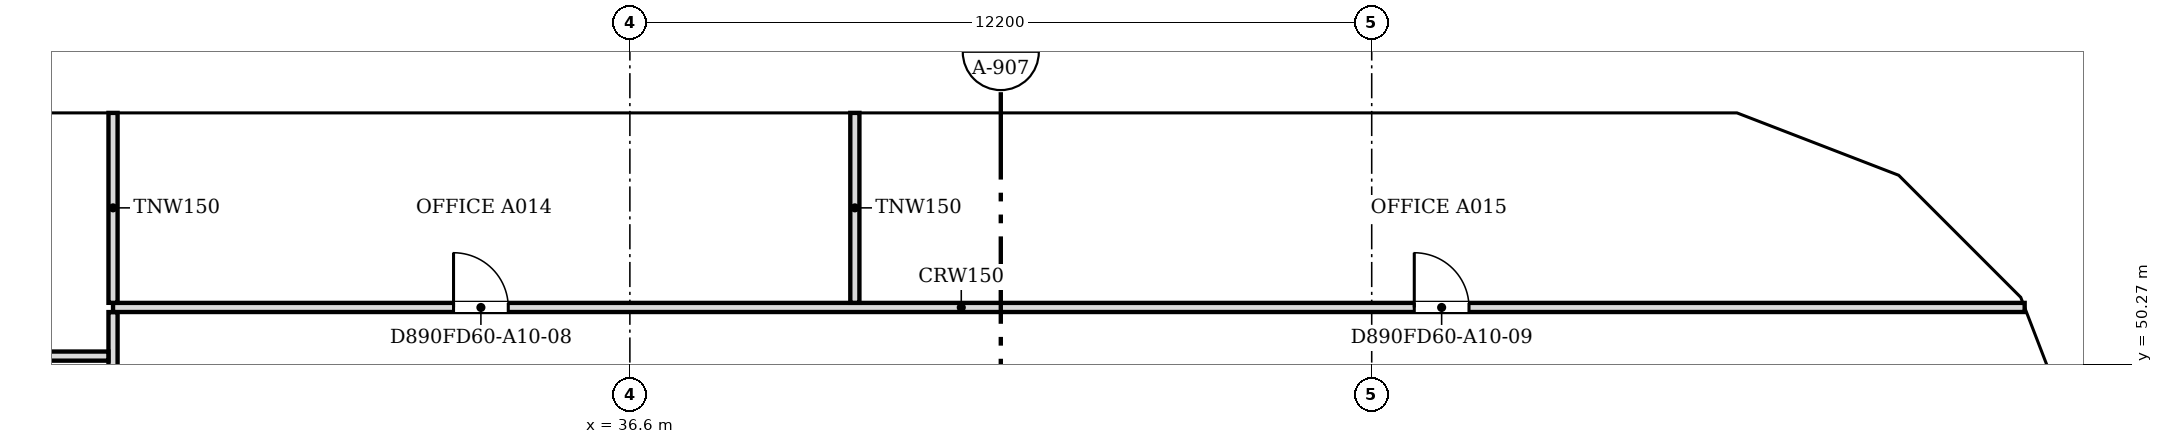
"""IFC4 building model, lengths in metres.
Left out: names, types, materials, properties, quantities, classifications, styles, units other than length and angle.
Written with IfcOpenShell. Run it as: python <this file> out.ifc"""

import sys

from ifc_helpers import new_model, si_unit, direction, frame, frame_2d, origin, place, context, subcontext, project, spatial, polyline, rectangle, outline, extrude, faceted_brep, source, transform, mapped, element, fill, save


model = new_model("IFC4")
c1 = context("Model", 3, precision=1e-05, world=origin(), true_north=direction((0.0, 1.0)))
c2 = subcontext(c1, "Body", "Model", "MODEL_VIEW")
j1 = project(units=[si_unit("LENGTHUNIT", "METRE"), si_unit("PLANEANGLEUNIT", "RADIAN")], contexts=[c1])
p1 = place(None, origin())
s1 = spatial("IfcSite", under=j1, at=p1, CompositionType="ELEMENT")
p2 = place(p1, origin())
s2 = spatial("IfcBuilding", under=s1, at=p2, CompositionType="ELEMENT")
p3 = place(p2, frame((0.0, 0.0, 116.4)))
s3 = spatial("IfcBuildingStorey", under=s2, at=p3, CompositionType="ELEMENT", Elevation=116.4)
m1 = source(origin(), c2, "Body", "Brep", [
    faceted_brep([(0.047, -0.25, 0.0), (2.997, -0.25, 3.8), (0.047, -0.25, 7.6), (0.0, -0.25, 7.541), (0.0, -0.25, 0.059), (0.093, 0.25, 7.54), (2.944, 0.25, 3.868), (2.944, 0.25, 3.732), (0.093, 0.25, 0.06), (2.997, 0.0, 3.8), (0.047, 0.0, 0.0), (0.047, 0.0, 7.6)], [[[0, 1, 2, 3, 4]], [[5, 6, 7, 8]], [[8, 7, 9, 1, 0, 10]], [[6, 5, 11, 2, 1, 9]], [[3, 2, 11]], [[10, 0, 4]], [[8, 10, 4, 3, 11, 5]], [[9, 7, 6]]]),
])
p4 = place(p3, frame((60.767, 48.71, -3.8), z_axis=(0.0, 0.0, 1.0), x_axis=(-0.359901446078, 0.932990326376, 0.0)))
e1 = element("IfcWall", 1, at=p4, inside=s3, PredefinedType="SOLIDWALL", context=c2, shape_type="MappedRepresentation", body=[
    mapped(m1, transform((0.0, 0.0, 0.0), scale=1.0)),
])
m2 = source(origin(), c2, "Body", "SweptSolid", [
    extrude(outline(polyline([(0.247, 0.665), (2.681, 3.8), (0.247, 6.935), (0.247, 0.665)])), frame((0.0, 0.26, 0.0), z_axis=(0.0, -1.0, 0.0), x_axis=(1.0, 0.0, 0.0)), (0.0, 0.0, 1.0), 0.52),
])
p5 = place(p4, origin())
e2 = element("IfcOpeningElement", 2, at=p5, cuts=e1, PredefinedType="OPENING", context=c2, shape_type="MappedRepresentation", body=[
    mapped(m2, transform((0.0, 0.0, 0.0), scale=1.0)),
])
m3 = source(origin(), c2, "Body", "Brep", [
    faceted_brep([(2.944, -0.25, 0.0), (2.997, -0.25, 0.068), (2.997, -0.25, 7.532), (2.944, -0.25, 7.6), (0.0, -0.25, 3.8), (0.053, 0.25, 3.868), (2.891, 0.25, 7.532), (2.891, 0.25, 0.068), (0.053, 0.25, 3.731), (2.944, 0.0, 0.0), (2.944, 0.0, 7.6), (0.0, 0.0, 3.8)], [[[0, 1, 2, 3, 4]], [[5, 6, 7, 8]], [[1, 0, 9]], [[10, 3, 2]], [[6, 5, 11, 4, 3, 10]], [[8, 7, 9, 0, 4, 11]], [[8, 11, 5]], [[1, 9, 7, 6, 10, 2]]]),
])
p6 = place(p3, frame((59.688, 51.506, -3.8), z_axis=(0.0, 0.0, 1.0), x_axis=(-0.707106781187, 0.707106781187, 0.0)))
e3 = element("IfcWall", 3, at=p6, inside=s3, PredefinedType="SOLIDWALL", context=c2, shape_type="MappedRepresentation", body=[
    mapped(m3, transform((0.0, 0.0, 0.0), scale=1.0)),
])
m4 = source(origin(), c2, "Body", "SweptSolid", [
    extrude(outline(polyline([(2.744, 6.934), (0.316, 3.8), (2.744, 0.666), (2.744, 6.934)])), frame((0.0, 0.26, 0.0), z_axis=(0.0, -1.0, 0.0), x_axis=(1.0, 0.0, 0.0)), (0.0, 0.0, 1.0), 0.52),
])
p7 = place(p6, origin())
e4 = element("IfcOpeningElement", 4, at=p7, cuts=e3, PredefinedType="OPENING", context=c2, shape_type="MappedRepresentation", body=[
    mapped(m4, transform((0.0, 0.0, 0.0), scale=1.0)),
])
m5 = source(origin(), c2, "Body", "Brep", [
    faceted_brep([(0.053, -0.25, 0.0), (3.003, -0.25, 3.8), (0.053, -0.25, 7.6), (0.0, -0.25, 7.531), (0.0, -0.25, 0.068), (0.106, 0.25, 7.532), (2.957, 0.25, 3.86), (2.957, 0.25, 3.74), (0.106, 0.25, 0.068), (3.003, 0.0, 3.8), (0.053, 0.0, 0.0), (0.053, 0.0, 7.6)], [[[0, 1, 2, 3, 4]], [[5, 6, 7, 8]], [[8, 7, 9, 1, 0, 10]], [[6, 5, 11, 2, 1, 9]], [[3, 2, 11]], [[10, 0, 4]], [[8, 10, 4, 3, 11, 5]], [[9, 7, 6]]]),
])
p8 = place(p3, frame((57.656, 53.569, -3.8), z_axis=(0.0, 0.0, 1.0), x_axis=(-0.933007896601, 0.359855894603, 0.0)))
e5 = element("IfcWall", 5, at=p8, inside=s3, PredefinedType="SOLIDWALL", context=c2, shape_type="MappedRepresentation", body=[
    mapped(m5, transform((0.0, 0.0, 0.0), scale=1.0)),
])
m6 = source(origin(), c2, "Body", "SweptSolid", [
    extrude(outline(polyline([(0.253, 0.665), (2.687, 3.8), (0.253, 6.935), (0.253, 0.665)])), frame((0.0, 0.26, 0.0), z_axis=(0.0, -1.0, 0.0), x_axis=(1.0, 0.0, 0.0)), (0.0, 0.0, 1.0), 0.52),
])
p9 = place(p8, origin())
e6 = element("IfcOpeningElement", 6, at=p9, cuts=e5, PredefinedType="OPENING", context=c2, shape_type="MappedRepresentation", body=[
    mapped(m6, transform((0.0, 0.0, 0.0), scale=1.0)),
])
m7 = source(origin(), c2, "Body", "Brep", [
    faceted_brep([(3.003, -0.25, 0.0), (6.053, -0.25, 3.8), (3.003, -0.25, 7.6), (0.0, -0.25, 3.8), (0.047, 0.25, 3.859), (3.003, 0.25, 7.6), (6.053, 0.25, 3.8), (3.003, 0.25, 0.0), (0.047, 0.25, 3.741), (0.0, 0.0, 3.8)], [[[0, 1, 2, 3]], [[4, 5, 6, 7, 8]], [[7, 6, 1, 0]], [[6, 5, 2, 1]], [[5, 4, 9, 3, 2]], [[8, 7, 0, 3, 9]], [[8, 9, 4]]]),
])
p10 = place(p3, frame((54.854, 54.65, -3.8), z_axis=(0.0, 0.0, 1.0), x_axis=(-1.0, 0.0, 0.0)))
e7 = element("IfcWall", 7, at=p10, inside=s3, PredefinedType="SOLIDWALL", context=c2, shape_type="MappedRepresentation", body=[
    mapped(m7, transform((0.0, 0.0, 0.0), scale=1.0)),
])
m8 = source(origin(), c2, "Body", "SweptSolid", [
    extrude(outline(polyline([(3.005, 0.401), (5.733, 3.8), (3.005, 7.199), (0.319, 3.8), (3.005, 0.401)])), frame((0.0, 0.26, 0.0), z_axis=(0.0, -1.0, 0.0), x_axis=(1.0, 0.0, 0.0)), (0.0, 0.0, 1.0), 0.52),
])
p11 = place(p10, origin())
e8 = element("IfcOpeningElement", 8, at=p11, cuts=e7, PredefinedType="OPENING", context=c2, shape_type="MappedRepresentation", body=[
    mapped(m8, transform((0.0, 0.0, 0.0), scale=1.0)),
])
m9 = source(origin(), c2, "Body", "SweptSolid", [
    extrude(outline(polyline([(3.05, 0.0), (6.1, 3.8), (3.05, 7.6), (0.0, 3.8), (3.05, 0.0)])), frame((0.0, 0.25, 0.0), z_axis=(0.0, -1.0, 0.0), x_axis=(1.0, 0.0, 0.0)), (0.0, 0.0, 1.0), 0.5),
])
p12 = place(p3, frame((48.8, 54.65, -3.8), z_axis=(0.0, 0.0, 1.0), x_axis=(-1.0, 0.0, 0.0)))
e9 = element("IfcWall", 9, at=p12, inside=s3, PredefinedType="SOLIDWALL", context=c2, shape_type="MappedRepresentation", body=[
    mapped(m9, transform((0.0, 0.0, 0.0), scale=1.0)),
])
m10 = source(origin(), c2, "Body", "SweptSolid", [
    extrude(outline(polyline([(3.05, 0.399), (5.78, 3.8), (3.05, 7.2), (0.321, 3.8), (3.05, 0.399)])), frame((0.0, 0.26, 0.0), z_axis=(0.0, -1.0, 0.0), x_axis=(1.0, 0.0, 0.0)), (0.0, 0.0, 1.0), 0.52),
])
p13 = place(p12, origin())
e10 = element("IfcOpeningElement", 10, at=p13, cuts=e9, PredefinedType="OPENING", context=c2, shape_type="MappedRepresentation", body=[
    mapped(m10, transform((0.0, 0.0, 0.0), scale=1.0)),
])
m11 = source(origin(), c2, "Body", "Brep", [
    faceted_brep([(3.05, -0.25, 0.0), (6.1, -0.25, 3.8), (6.1, -0.25, 3.8), (3.05, -0.25, 7.6), (0.0, -0.25, 3.8), (0.0, 0.25, 3.8), (3.05, 0.25, 7.6), (6.1, 0.25, 3.8), (6.1, 0.25, 3.8), (3.05, 0.25, 0.0)], [[[0, 1, 2, 3, 4]], [[5, 6, 7, 8, 9]], [[9, 8, 1, 0]], [[7, 6, 3, 2]], [[6, 5, 4, 3]], [[5, 9, 0, 4]], [[1, 8, 7, 2]]]),
])
p14 = place(p3, frame((42.7, 54.65, -3.8), z_axis=(0.0, 0.0, 1.0), x_axis=(-1.0, 0.0, 0.0)))
e11 = element("IfcWall", 11, at=p14, inside=s3, PredefinedType="SOLIDWALL", context=c2, shape_type="MappedRepresentation", body=[
    mapped(m11, transform((0.0, 0.0, 0.0), scale=1.0)),
])
p15 = place(p14, origin())
e12 = element("IfcOpeningElement", 12, at=p15, cuts=e11, PredefinedType="OPENING", context=c2, shape_type="MappedRepresentation", body=[
    mapped(m10, transform((0.0, 0.0, 0.0), scale=1.0)),
])
p16 = place(p3, frame((36.6, 54.65, -3.8), z_axis=(0.0, 0.0, 1.0), x_axis=(-1.0, 0.0, 0.0)))
e13 = element("IfcWall", 13, at=p16, inside=s3, PredefinedType="SOLIDWALL", context=c2, shape_type="MappedRepresentation", body=[
    mapped(m9, transform((0.0, 0.0, 0.0), scale=1.0)),
])
p17 = place(p16, origin())
e14 = element("IfcOpeningElement", 14, at=p17, cuts=e13, PredefinedType="OPENING", context=c2, shape_type="MappedRepresentation", body=[
    mapped(m10, transform((0.0, 0.0, 0.0), scale=1.0)),
])
p18 = place(p3, frame((30.5, 54.65, -3.8), z_axis=(0.0, 0.0, 1.0), x_axis=(-1.0, 0.0, 0.0)))
e15 = element("IfcWall", 15, at=p18, inside=s3, PredefinedType="SOLIDWALL", context=c2, shape_type="MappedRepresentation", body=[
    mapped(m9, transform((0.0, 0.0, 0.0), scale=1.0)),
])
p19 = place(p18, origin())
e16 = element("IfcOpeningElement", 16, at=p19, cuts=e15, PredefinedType="OPENING", context=c2, shape_type="MappedRepresentation", body=[
    mapped(m10, transform((0.0, 0.0, 0.0), scale=1.0)),
])
p20 = place(p2, frame((0.0, 0.0, 120.2)))
s4 = spatial("IfcBuildingStorey", under=s2, at=p20, CompositionType="ELEMENT", Elevation=120.2)
m12 = source(origin(), c2, "Body", "Brep", [
    faceted_brep([(2.95, -0.25, 0.0), (3.003, -0.25, 0.068), (3.003, -0.25, 7.532), (2.95, -0.25, 7.6), (0.0, -0.25, 3.8), (0.047, 0.25, 3.86), (2.898, 0.25, 7.532), (2.898, 0.25, 0.068), (0.047, 0.25, 3.74), (2.95, 0.0, 0.0), (2.95, 0.0, 7.6), (0.0, 0.0, 3.8)], [[[0, 1, 2, 3, 4]], [[5, 6, 7, 8]], [[1, 0, 9]], [[10, 3, 2]], [[6, 5, 11, 4, 3, 10]], [[8, 7, 9, 0, 4, 11]], [[8, 11, 5]], [[1, 9, 7, 6, 10, 2]]]),
])
p21 = place(p20, frame((60.75, 48.753, -3.8), z_axis=(0.0, 0.0, 1.0), x_axis=(-0.35992665181, 0.932980602862, 0.0)))
e17 = element("IfcWall", 17, at=p21, inside=s4, PredefinedType="SOLIDWALL", context=c2, shape_type="MappedRepresentation", body=[
    mapped(m12, transform((0.0, 0.0, 0.0), scale=1.0)),
])
m13 = source(origin(), c2, "Body", "SweptSolid", [
    extrude(outline(polyline([(2.75, 6.935), (0.316, 3.8), (2.75, 0.665), (2.75, 6.935)])), frame((0.0, 0.26, 0.0), z_axis=(0.0, -1.0, 0.0), x_axis=(1.0, 0.0, 0.0)), (0.0, 0.0, 1.0), 0.52),
])
p22 = place(p21, origin())
e18 = element("IfcOpeningElement", 18, at=p22, cuts=e17, PredefinedType="OPENING", context=c2, shape_type="MappedRepresentation", body=[
    mapped(m13, transform((0.0, 0.0, 0.0), scale=1.0)),
])
m14 = source(origin(), c2, "Body", "Brep", [
    faceted_brep([(0.053, -0.25, 0.0), (2.997, -0.25, 3.8), (0.053, -0.25, 7.6), (0.0, -0.25, 7.532), (0.0, -0.25, 0.068), (0.106, 0.25, 7.532), (2.944, 0.25, 3.868), (2.944, 0.25, 3.732), (0.106, 0.25, 0.068), (2.997, 0.0, 3.8), (0.053, 0.0, 0.0), (0.053, 0.0, 7.6)], [[[0, 1, 2, 3, 4]], [[5, 6, 7, 8]], [[8, 7, 9, 1, 0, 10]], [[6, 5, 11, 2, 1, 9]], [[3, 2, 11]], [[10, 0, 4]], [[8, 10, 4, 3, 11, 5]], [[9, 7, 6]]]),
])
p23 = place(p20, frame((59.726, 51.469, -3.8), z_axis=(0.0, 0.0, 1.0), x_axis=(-0.707106781187, 0.707106781187, 0.0)))
e19 = element("IfcWall", 19, at=p23, inside=s4, PredefinedType="SOLIDWALL", context=c2, shape_type="MappedRepresentation", body=[
    mapped(m14, transform((0.0, 0.0, 0.0), scale=1.0)),
])
m15 = source(origin(), c2, "Body", "SweptSolid", [
    extrude(outline(polyline([(0.253, 0.667), (2.681, 3.8), (0.253, 6.934), (0.253, 0.667)])), frame((0.0, 0.26, 0.0), z_axis=(0.0, -1.0, 0.0), x_axis=(1.0, 0.0, 0.0)), (0.0, 0.0, 1.0), 0.52),
])
p24 = place(p23, origin())
e20 = element("IfcOpeningElement", 20, at=p24, cuts=e19, PredefinedType="OPENING", context=c2, shape_type="MappedRepresentation", body=[
    mapped(m15, transform((0.0, 0.0, 0.0), scale=1.0)),
])
m16 = source(origin(), c2, "Body", "Brep", [
    faceted_brep([(2.95, -0.25, 0.0), (2.997, -0.25, 0.059), (2.997, -0.25, 7.541), (2.95, -0.25, 7.6), (0.0, -0.25, 3.8), (0.053, 0.25, 3.868), (2.904, 0.25, 7.54), (2.904, 0.25, 0.06), (0.053, 0.25, 3.732), (2.95, 0.0, 0.0), (2.95, 0.0, 7.6), (0.0, 0.0, 3.8)], [[[0, 1, 2, 3, 4]], [[5, 6, 7, 8]], [[1, 0, 9]], [[10, 3, 2]], [[6, 5, 11, 4, 3, 10]], [[8, 7, 9, 0, 4, 11]], [[8, 11, 5]], [[1, 9, 7, 6, 10, 2]]]),
])
p25 = place(p20, frame((57.606, 53.588, -3.8), z_axis=(0.0, 0.0, 1.0), x_axis=(-0.932990326376, 0.359901446078, 0.0)))
e21 = element("IfcWall", 21, at=p25, inside=s4, PredefinedType="SOLIDWALL", context=c2, shape_type="MappedRepresentation", body=[
    mapped(m16, transform((0.0, 0.0, 0.0), scale=1.0)),
])
p26 = place(p25, origin())
e22 = element("IfcOpeningElement", 22, at=p26, cuts=e21, PredefinedType="OPENING", context=c2, shape_type="MappedRepresentation", body=[
    mapped(m13, transform((0.0, 0.0, 0.0), scale=1.0)),
])
m17 = source(origin(), c2, "Body", "Brep", [
    faceted_brep([(0.047, -0.25, 0.0), (3.05, -0.25, 3.8), (0.047, -0.25, 7.6), (0.0, -0.25, 7.54), (0.0, -0.25, 0.06), (0.093, 0.25, 7.541), (3.05, 0.25, 3.8), (0.093, 0.25, 0.059), (0.047, 0.0, 0.0), (0.047, 0.0, 7.6)], [[[0, 1, 2, 3, 4]], [[5, 6, 7]], [[7, 6, 1, 0, 8]], [[6, 5, 9, 2, 1]], [[3, 2, 9]], [[8, 0, 4]], [[7, 8, 4, 3, 9, 5]]]),
])
p27 = place(p20, frame((54.9, 54.65, -3.8), z_axis=(0.0, 0.0, 1.0), x_axis=(-1.0, 0.0, 0.0)))
e23 = element("IfcWall", 23, at=p27, inside=s4, PredefinedType="SOLIDWALL", context=c2, shape_type="MappedRepresentation", body=[
    mapped(m17, transform((0.0, 0.0, 0.0), scale=1.0)),
])
m18 = source(origin(), c2, "Body", "SweptSolid", [
    extrude(outline(polyline([(0.247, 0.656), (2.731, 3.8), (0.247, 6.944), (0.247, 0.656)])), frame((0.0, 0.26, 0.0), z_axis=(0.0, -1.0, 0.0), x_axis=(1.0, 0.0, 0.0)), (0.0, 0.0, 1.0), 0.52),
])
p28 = place(p27, origin())
e24 = element("IfcOpeningElement", 24, at=p28, cuts=e23, PredefinedType="OPENING", context=c2, shape_type="MappedRepresentation", body=[
    mapped(m18, transform((0.0, 0.0, 0.0), scale=1.0)),
])
m19 = source(origin(), c2, "Body", "SweptSolid", [
    extrude(outline(polyline([(3.05, 0.0), (6.1, 3.8), (3.05, 7.6), (0.0, 3.8), (3.05, 0.0)])), frame((0.0, 0.25, 0.0), z_axis=(0.0, -1.0, 0.0), x_axis=(1.0, 0.0, 0.0)), (0.0, 0.0, 1.0), 0.5),
])
p29 = place(p20, frame((51.85, 54.65, -3.8), z_axis=(0.0, 0.0, 1.0), x_axis=(-1.0, 0.0, 0.0)))
e25 = element("IfcWall", 25, at=p29, inside=s4, PredefinedType="SOLIDWALL", context=c2, shape_type="MappedRepresentation", body=[
    mapped(m19, transform((0.0, 0.0, 0.0), scale=1.0)),
])
m20 = source(origin(), c2, "Body", "SweptSolid", [
    extrude(outline(polyline([(3.05, 0.399), (5.78, 3.8), (3.05, 7.201), (0.321, 3.8), (3.05, 0.399)])), frame((0.0, 0.26, 0.0), z_axis=(0.0, -1.0, 0.0), x_axis=(1.0, 0.0, 0.0)), (0.0, 0.0, 1.0), 0.52),
])
p30 = place(p29, origin())
e26 = element("IfcOpeningElement", 26, at=p30, cuts=e25, PredefinedType="OPENING", context=c2, shape_type="MappedRepresentation", body=[
    mapped(m20, transform((0.0, 0.0, 0.0), scale=1.0)),
])
p31 = place(p20, frame((45.75, 54.65, -3.8), z_axis=(0.0, 0.0, 1.0), x_axis=(-1.0, 0.0, 0.0)))
e27 = element("IfcWall", 27, at=p31, inside=s4, PredefinedType="SOLIDWALL", context=c2, shape_type="MappedRepresentation", body=[
    mapped(m19, transform((0.0, 0.0, 0.0), scale=1.0)),
])
p32 = place(p31, origin())
e28 = element("IfcOpeningElement", 28, at=p32, cuts=e27, PredefinedType="OPENING", context=c2, shape_type="MappedRepresentation", body=[
    mapped(m20, transform((0.0, 0.0, 0.0), scale=1.0)),
])
m21 = source(origin(), c2, "Body", "Brep", [
    faceted_brep([(3.05, -0.25, 0.0), (6.1, -0.25, 3.8), (6.1, -0.25, 3.8), (3.05, -0.25, 7.6), (0.0, -0.25, 3.8), (0.0, 0.25, 3.8), (3.05, 0.25, 7.6), (6.1, 0.25, 3.8), (6.1, 0.25, 3.8), (3.05, 0.25, 0.0)], [[[0, 1, 2, 3, 4]], [[5, 6, 7, 8, 9]], [[9, 8, 1, 0]], [[7, 6, 3, 2]], [[6, 5, 4, 3]], [[5, 9, 0, 4]], [[1, 8, 7, 2]]]),
])
p33 = place(p20, frame((39.65, 54.65, -3.8), z_axis=(0.0, 0.0, 1.0), x_axis=(-1.0, 0.0, 0.0)))
e29 = element("IfcWall", 29, at=p33, inside=s4, PredefinedType="SOLIDWALL", context=c2, shape_type="MappedRepresentation", body=[
    mapped(m21, transform((0.0, 0.0, 0.0), scale=1.0)),
])
p34 = place(p33, origin())
e30 = element("IfcOpeningElement", 30, at=p34, cuts=e29, PredefinedType="OPENING", context=c2, shape_type="MappedRepresentation", body=[
    mapped(m20, transform((0.0, 0.0, 0.0), scale=1.0)),
])
p35 = place(p20, frame((33.55, 54.65, -3.8), z_axis=(0.0, 0.0, 1.0), x_axis=(-1.0, 0.0, 0.0)))
e31 = element("IfcWall", 31, at=p35, inside=s4, PredefinedType="SOLIDWALL", context=c2, shape_type="MappedRepresentation", body=[
    mapped(m19, transform((0.0, 0.0, 0.0), scale=1.0)),
])
p36 = place(p35, origin())
e32 = element("IfcOpeningElement", 32, at=p36, cuts=e31, PredefinedType="OPENING", context=c2, shape_type="MappedRepresentation", body=[
    mapped(m20, transform((0.0, 0.0, 0.0), scale=1.0)),
])
p37 = place(p20, frame((27.45, 54.65, -3.8), z_axis=(0.0, 0.0, 1.0), x_axis=(-1.0, 0.0, 0.0)))
e33 = element("IfcWall", 33, at=p37, inside=s4, PredefinedType="SOLIDWALL", context=c2, shape_type="MappedRepresentation", body=[
    mapped(m21, transform((0.0, 0.0, 0.0), scale=1.0)),
])
p38 = place(p37, origin())
e34 = element("IfcOpeningElement", 34, at=p38, cuts=e33, PredefinedType="OPENING", context=c2, shape_type="MappedRepresentation", body=[
    mapped(m20, transform((0.0, 0.0, 0.0), scale=1.0)),
])
p39 = place(p3, frame((28.1, 47.376, 0.0), z_axis=(0.0, 0.0, 1.0), x_axis=(0.0, 1.0, 0.0)))
e35 = element("IfcWall", 35, at=p39, inside=s3, PredefinedType="PARTITIONING", context=c2, shape_type="SweptSolid", body=[
    extrude(rectangle(XDim=3.748, YDim=0.15, at=frame_2d((1.874, 0.0))), origin(), (0.0, 0.0, 1.0), 3.067),
])
p40 = place(p3, frame((22.75, 50.4, 0.0), z_axis=(0.0, 0.0, 1.0), x_axis=(1.0, 0.0, 0.0)))
e36 = element("IfcWall", 36, at=p40, inside=s3, PredefinedType="PARTITIONING", context=c2, shape_type="SweptSolid", body=[
    extrude(rectangle(XDim=5.274, YDim=0.15, at=frame_2d((2.637, 0.0))), origin(), (0.0, 0.0, 1.0), 3.067),
])
m22 = source(origin(), c2, "Body", "SweptSolid", [
    extrude(rectangle(XDim=0.9, YDim=2.1, at=frame_2d((0.45, 1.05))), frame((0.0, 0.085, 0.0), z_axis=(0.0, -1.0, 0.0), x_axis=(1.0, 0.0, 0.0)), (0.0, 0.0, 1.0), 0.17),
])
p41 = place(p40, frame((2.2, 0.0, 0.0)))
e37 = element("IfcOpeningElement", 37, at=p41, cuts=e36, PredefinedType="OPENING", context=c2, shape_type="MappedRepresentation", body=[
    mapped(m22, transform((0.0, 0.0, 0.0), scale=1.0)),
])
p42 = place(p3, frame((28.1, 51.2, 0.0), z_axis=(0.0, 0.0, 1.0), x_axis=(1.0, 0.0, 0.0)))
e38 = element("IfcWall", 38, at=p42, inside=s3, PredefinedType="PARTITIONING", context=c2, shape_type="SweptSolid", body=[
    extrude(rectangle(XDim=31.438, YDim=0.15, at=frame_2d((15.719, 0.0))), origin(), (0.0, 0.0, 1.0), 3.067),
])
p43 = place(p42, frame((5.6, 0.0, 0.0)))
e39 = element("IfcOpeningElement", 39, at=p43, cuts=e38, PredefinedType="OPENING", context=c2, shape_type="MappedRepresentation", body=[
    mapped(m22, transform((0.0, 0.0, 0.0), scale=1.0)),
])
p44 = place(p42, frame((21.4, 0.0, 0.0)))
e40 = element("IfcOpeningElement", 40, at=p44, cuts=e38, PredefinedType="OPENING", context=c2, shape_type="MappedRepresentation", body=[
    mapped(m22, transform((0.0, 0.0, 0.0), scale=1.0)),
])
for number, where, z_axis, x_axis in (
    (41, (28.1, 51.276, 0.0), (0.0, 0.0, 1.0), (0.0, 1.0, 0.0)),
    (42, (40.3, 51.276, 0.0), (0.0, 0.0, 1.0), (0.0, 1.0, 0.0)),
):
    element("IfcWall", number, at=place(p3, frame(where, z_axis=z_axis, x_axis=x_axis)), inside=s3, PredefinedType="PARTITIONING", context=c2, shape_type="SweptSolid", body=[
        extrude(rectangle(XDim=3.124, YDim=0.15, at=frame_2d((1.562, 0.0))), origin(), (0.0, 0.0, 1.0), 3.067),
    ])
m23 = source(origin(), c2, "Body", "SweptSolid", [
    extrude(rectangle(XDim=0.9, YDim=2.1, at=frame_2d((0.45, 1.05))), frame((0.0, 0.025, 0.0), z_axis=(0.0, -1.0, 0.0), x_axis=(1.0, 0.0, 0.0)), (0.0, 0.0, 1.0), 0.05),
])
p45 = place(p43, origin())
e43 = element("IfcDoor", 43, at=p45, inside=s3, OperationType="SINGLE_SWING_LEFT", PredefinedType="DOOR", context=c2, shape_type="MappedRepresentation", body=[
    mapped(m23, transform((0.0, 0.0, 0.0), scale=1.0)),
])
fill(e39, e43)
p46 = place(p44, origin())
e44 = element("IfcDoor", 44, at=p46, inside=s3, OperationType="SINGLE_SWING_LEFT", PredefinedType="DOOR", context=c2, shape_type="MappedRepresentation", body=[
    mapped(m23, transform((0.0, 0.0, 0.0), scale=1.0)),
])
fill(e40, e44)
save(model, sys.argv[1])
